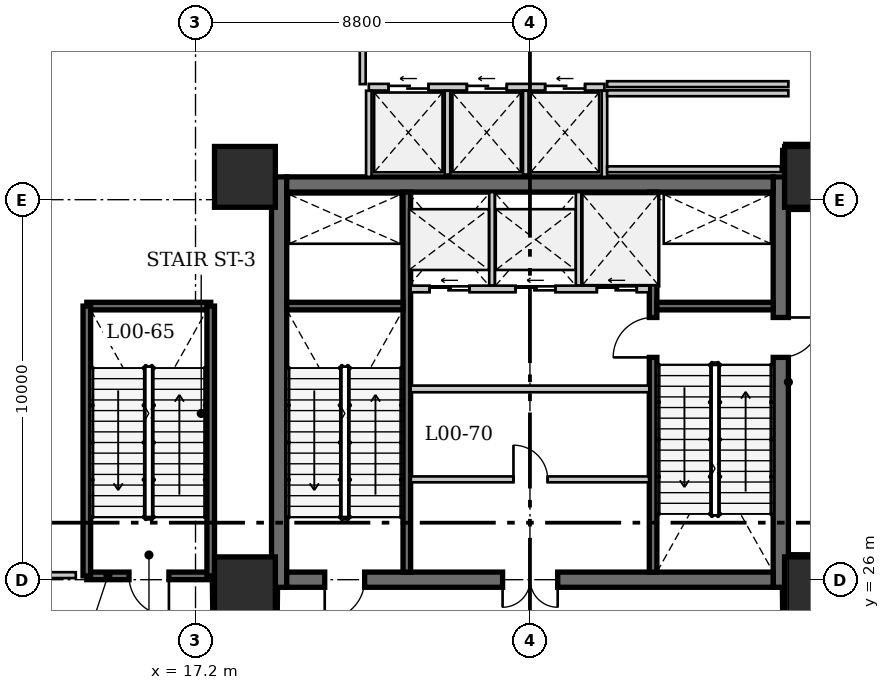
"""IFC4 building model, lengths in metres.
Left out: names, types, materials, properties, quantities, classifications, styles, units other than length and angle.
Written with IfcOpenShell. Run it as: python <this file> out.ifc"""

import sys

from ifc_helpers import new_model, si_unit, direction, frame, frame_2d, origin, origin_2d, place, context, subcontext, project, spatial, rectangle, extrude, source, transform, mapped, element, fill, save


model = new_model("IFC4")
c1 = context("Model", 3, precision=1e-05, world=origin(), true_north=direction((0.0, 1.0)))
c2 = subcontext(c1, "Body", "Model", "MODEL_VIEW")
j1 = project(units=[si_unit("LENGTHUNIT", "METRE"), si_unit("PLANEANGLEUNIT", "RADIAN")], contexts=[c1])
p1 = place(None, origin())
s1 = spatial("IfcSite", under=j1, at=p1, CompositionType="ELEMENT")
p2 = place(p1, origin())
s2 = spatial("IfcBuilding", under=s1, at=p2, CompositionType="ELEMENT")
p3 = place(p2, origin())
s3 = spatial("IfcBuildingStorey", under=s2, at=p3, CompositionType="ELEMENT", Elevation=0.0)
for number, where, z_axis, x_axis in (
    (1, (18.5, 25.8, 0.0), (0.0, 0.0, 1.0), (1.0, 0.0, 0.0)),
    (2, (18.5, 36.6, 0.0), (0.0, 0.0, 1.0), (1.0, 0.0, 0.0)),
    (3, (33.5, 25.8, 0.0), (0.0, 0.0, 1.0), (1.0, 0.0, 0.0)),
    (4, (33.5, 36.6, 0.0), (0.0, 0.0, 1.0), (1.0, 0.0, 0.0)),
):
    element("IfcColumn", number, at=place(p3, frame(where, z_axis=z_axis, x_axis=x_axis)), inside=s3, PredefinedType="COLUMN", context=c2, shape_type="SweptSolid", body=[
        extrude(rectangle(XDim=1.6, YDim=1.6, at=origin_2d()), origin(), (0.0, 0.0, 1.0), 4.9),
    ])
p4 = place(p3, frame((19.4, 25.8, 0.0), z_axis=(0.0, 0.0, 1.0), x_axis=(0.0, 1.0, 0.0)))
e5 = element("IfcWall", 5, at=p4, inside=s3, PredefinedType="SHEAR", context=c2, shape_type="SweptSolid", body=[
    extrude(rectangle(XDim=10.8, YDim=0.4, at=frame_2d((5.4, 0.0))), origin(), (0.0, 0.0, 1.0), 5.2),
])
p5 = place(p3, frame((32.6, 36.6, 0.0), z_axis=(0.0, 0.0, 1.0), x_axis=(0.0, -1.0, 0.0)))
e6 = element("IfcWall", 6, at=p5, inside=s3, PredefinedType="SHEAR", context=c2, shape_type="SweptSolid", body=[
    extrude(rectangle(XDim=10.8, YDim=0.4, at=frame_2d((5.4, 0.0))), origin(), (0.0, 0.0, 1.0), 5.2),
])
p6 = place(p5, frame((3.7, 0.0, 0.0)))
e7 = element("IfcOpeningElement", 7, at=p6, cuts=e6, PredefinedType="OPENING", context=c2, shape_type="SweptSolid", body=[
    extrude(rectangle(XDim=1.05, YDim=2.15, at=frame_2d((0.525, 1.075))), frame((0.0, 0.21, 0.0), z_axis=(0.0, -1.0, 0.0), x_axis=(1.0, 0.0, 0.0)), (0.0, 0.0, 1.0), 0.42),
])
p7 = place(p3, frame((19.6, 36.4, 0.0), z_axis=(0.0, 0.0, 1.0), x_axis=(1.0, 0.0, 0.0)))
e8 = element("IfcWall", 8, at=p7, inside=s3, PredefinedType="SHEAR", context=c2, shape_type="SweptSolid", body=[
    extrude(rectangle(XDim=12.8, YDim=0.4, at=frame_2d((6.4, 0.0))), origin(), (0.0, 0.0, 1.0), 5.2),
])
p8 = place(p3, frame((32.4, 26.0, 0.0), z_axis=(0.0, 0.0, 1.0), x_axis=(-1.0, 0.0, 0.0)))
e9 = element("IfcWall", 9, at=p8, inside=s3, PredefinedType="SHEAR", context=c2, shape_type="SweptSolid", body=[
    extrude(rectangle(XDim=12.8, YDim=0.4, at=frame_2d((6.4, 0.0))), origin(), (0.0, 0.0, 1.0), 5.2),
])
p9 = place(p8, frame((10.75, 0.0, 0.0)))
e10 = element("IfcOpeningElement", 10, at=p9, cuts=e9, PredefinedType="OPENING", context=c2, shape_type="SweptSolid", body=[
    extrude(rectangle(XDim=1.05, YDim=2.15, at=frame_2d((0.525, 1.075))), frame((0.0, 0.21, 0.0), z_axis=(0.0, -1.0, 0.0), x_axis=(1.0, 0.0, 0.0)), (0.0, 0.0, 1.0), 0.42),
])
p10 = place(p8, frame((5.67, 0.0, 0.0)))
e11 = element("IfcOpeningElement", 11, at=p10, cuts=e9, PredefinedType="OPENING", context=c2, shape_type="SweptSolid", body=[
    extrude(rectangle(XDim=1.45, YDim=2.2, at=frame_2d((0.725, 1.1))), frame((0.0, 0.21, 0.0), z_axis=(0.0, -1.0, 0.0), x_axis=(1.0, 0.0, 0.0)), (0.0, 0.0, 1.0), 0.42),
])
p11 = place(p3, frame((22.76, 26.2, 0.0), z_axis=(0.0, 0.0, 1.0), x_axis=(0.0, 1.0, 0.0)))
e12 = element("IfcWall", 12, at=p11, inside=s3, PredefinedType="SHEAR", context=c2, shape_type="SweptSolid", body=[
    extrude(rectangle(XDim=10.0, YDim=0.2, at=frame_2d((5.0, 0.0))), origin(), (0.0, 0.0, 1.0), 5.2),
])
p12 = place(p3, frame((29.24, 26.2, 0.0), z_axis=(0.0, 0.0, 1.0), x_axis=(0.0, 1.0, 0.0)))
e13 = element("IfcWall", 13, at=p12, inside=s3, PredefinedType="SHEAR", context=c2, shape_type="SweptSolid", body=[
    extrude(rectangle(XDim=10.0, YDim=0.2, at=frame_2d((5.0, 0.0))), origin(), (0.0, 0.0, 1.0), 5.2),
])
p13 = place(p12, frame((5.65, 0.0, 0.0)))
e14 = element("IfcOpeningElement", 14, at=p13, cuts=e13, PredefinedType="OPENING", context=c2, shape_type="SweptSolid", body=[
    extrude(rectangle(XDim=1.05, YDim=2.15, at=frame_2d((0.525, 1.075))), frame((0.0, 0.11, 0.0), z_axis=(0.0, -1.0, 0.0), x_axis=(1.0, 0.0, 0.0)), (0.0, 0.0, 1.0), 0.22),
])
for number, where, z_axis, x_axis in (
    (15, (19.6, 33.2, 0.0), (0.0, 0.0, 1.0), (1.0, 0.0, 0.0)),
    (16, (29.34, 33.2, 0.0), (0.0, 0.0, 1.0), (1.0, 0.0, 0.0)),
):
    element("IfcWall", number, at=place(p3, frame(where, z_axis=z_axis, x_axis=x_axis)), inside=s3, PredefinedType="SHEAR", context=c2, shape_type="SweptSolid", body=[
        extrude(rectangle(XDim=3.06, YDim=0.2, at=frame_2d((1.53, 0.0))), origin(), (0.0, 0.0, 1.0), 5.2),
    ])
p14 = place(p3, frame((22.86, 33.65, 0.0), z_axis=(0.0, 0.0, 1.0), x_axis=(1.0, 0.0, 0.0)))
e17 = element("IfcWall", 17, at=p14, inside=s3, PredefinedType="SOLIDWALL", context=c2, shape_type="SweptSolid", body=[
    extrude(rectangle(XDim=6.28, YDim=0.175, at=frame_2d((3.14, 0.0))), origin(), (0.0, 0.0, 1.0), 4.9),
])
p15 = place(p14, frame((0.5, 0.0, 0.0)))
e18 = element("IfcOpeningElement", 18, at=p15, cuts=e17, PredefinedType="OPENING", context=c2, shape_type="SweptSolid", body=[
    extrude(rectangle(XDim=1.05, YDim=2.15, at=frame_2d((0.525, 1.075))), frame((0.0, 0.098, 0.0), z_axis=(0.0, -1.0, 0.0), x_axis=(1.0, 0.0, 0.0)), (0.0, 0.0, 1.0), 0.195),
])
p16 = place(p14, frame((2.76, 0.0, 0.0)))
e19 = element("IfcOpeningElement", 19, at=p16, cuts=e17, PredefinedType="OPENING", context=c2, shape_type="SweptSolid", body=[
    extrude(rectangle(XDim=1.05, YDim=2.15, at=frame_2d((0.525, 1.075))), frame((0.0, 0.098, 0.0), z_axis=(0.0, -1.0, 0.0), x_axis=(1.0, 0.0, 0.0)), (0.0, 0.0, 1.0), 0.195),
])
p17 = place(p14, frame((4.9, 0.0, 0.0)))
e20 = element("IfcOpeningElement", 20, at=p17, cuts=e17, PredefinedType="OPENING", context=c2, shape_type="SweptSolid", body=[
    extrude(rectangle(XDim=1.05, YDim=2.15, at=frame_2d((0.525, 1.075))), frame((0.0, 0.098, 0.0), z_axis=(0.0, -1.0, 0.0), x_axis=(1.0, 0.0, 0.0)), (0.0, 0.0, 1.0), 0.195),
])
for number, where, z_axis, x_axis in (
    (21, (25.0, 33.743, 0.0), (0.0, 0.0, 1.0), (0.0, 1.0, 0.0)),
    (22, (27.28, 33.743, 0.0), (0.0, 0.0, 1.0), (0.0, 1.0, 0.0)),
):
    element("IfcWall", number, at=place(p3, frame(where, z_axis=z_axis, x_axis=x_axis)), inside=s3, PredefinedType="SOLIDWALL", context=c2, shape_type="SweptSolid", body=[
        extrude(rectangle(XDim=2.457, YDim=0.145, at=frame_2d((1.228, 0.0))), origin(), (0.0, 0.0, 1.0), 4.9),
    ])
p18 = place(p3, frame((22.86, 31.02, 0.0), z_axis=(0.0, 0.0, 1.0), x_axis=(1.0, 0.0, 0.0)))
e23 = element("IfcWall", 23, at=p18, inside=s3, PredefinedType="SOLIDWALL", context=c2, shape_type="SweptSolid", body=[
    extrude(rectangle(XDim=6.28, YDim=0.175, at=frame_2d((3.14, 0.0))), origin(), (0.0, 0.0, 1.0), 4.9),
])
p19 = place(p3, frame((22.866, 28.64, 0.0), z_axis=(0.0, 0.0, 1.0), x_axis=(1.0, 0.0, 0.0)))
e24 = element("IfcWall", 24, at=p19, inside=s3, PredefinedType="PARTITIONING", context=c2, shape_type="SweptSolid", body=[
    extrude(rectangle(XDim=6.268, YDim=0.155, at=frame_2d((3.134, 0.0))), origin(), (0.0, 0.0, 1.0), 4.9),
])
p20 = place(p19, frame((2.7, 0.0, 0.0)))
e25 = element("IfcOpeningElement", 25, at=p20, cuts=e24, PredefinedType="OPENING", context=c2, shape_type="SweptSolid", body=[
    extrude(rectangle(XDim=0.9, YDim=2.1, at=frame_2d((0.45, 1.05))), frame((0.0, 0.087, 0.0), z_axis=(0.0, -1.0, 0.0), x_axis=(1.0, 0.0, 0.0)), (0.0, 0.0, 1.0), 0.175),
])
p21 = place(p3, frame((21.76, 38.96, 0.0), z_axis=(0.0, 0.0, 1.0), x_axis=(1.0, 0.0, 0.0)))
e26 = element("IfcWall", 26, at=p21, inside=s3, PredefinedType="SOLIDWALL", context=c2, shape_type="SweptSolid", body=[
    extrude(rectangle(XDim=6.2, YDim=0.175, at=frame_2d((3.1, 0.0))), origin(), (0.0, 0.0, 1.0), 4.9),
])
p22 = place(p21, frame((0.52, 0.0, 0.0)))
e27 = element("IfcOpeningElement", 27, at=p22, cuts=e26, PredefinedType="OPENING", context=c2, shape_type="SweptSolid", body=[
    extrude(rectangle(XDim=1.05, YDim=2.15, at=frame_2d((0.525, 1.075))), frame((0.0, 0.098, 0.0), z_axis=(0.0, -1.0, 0.0), x_axis=(1.0, 0.0, 0.0)), (0.0, 0.0, 1.0), 0.195),
])
p23 = place(p21, frame((2.58, 0.0, 0.0)))
e28 = element("IfcOpeningElement", 28, at=p23, cuts=e26, PredefinedType="OPENING", context=c2, shape_type="SweptSolid", body=[
    extrude(rectangle(XDim=1.05, YDim=2.15, at=frame_2d((0.525, 1.075))), frame((0.0, 0.098, 0.0), z_axis=(0.0, -1.0, 0.0), x_axis=(1.0, 0.0, 0.0)), (0.0, 0.0, 1.0), 0.195),
])
p24 = place(p21, frame((4.64, 0.0, 0.0)))
e29 = element("IfcOpeningElement", 29, at=p24, cuts=e26, PredefinedType="OPENING", context=c2, shape_type="SweptSolid", body=[
    extrude(rectangle(XDim=1.05, YDim=2.15, at=frame_2d((0.525, 1.075))), frame((0.0, 0.098, 0.0), z_axis=(0.0, -1.0, 0.0), x_axis=(1.0, 0.0, 0.0)), (0.0, 0.0, 1.0), 0.195),
])
for number, where, z_axis, x_axis in (
    (30, (21.76, 36.6, 0.0), (0.0, 0.0, 1.0), (0.0, 1.0, 0.0)),
    (31, (27.96, 36.6, 0.0), (0.0, 0.0, 1.0), (0.0, 1.0, 0.0)),
):
    element("IfcWall", number, at=place(p3, frame(where, z_axis=z_axis, x_axis=x_axis)), inside=s3, PredefinedType="SOLIDWALL", context=c2, shape_type="SweptSolid", body=[
        extrude(rectangle(XDim=2.266, YDim=0.145, at=frame_2d((1.133, 0.0))), origin(), (0.0, 0.0, 1.0), 4.9),
    ])
for number, where, z_axis, x_axis in (
    (32, (23.83, 36.66, 0.0), (0.0, 0.0, 1.0), (0.0, 1.0, 0.0)),
    (33, (25.89, 36.66, 0.0), (0.0, 0.0, 1.0), (0.0, 1.0, 0.0)),
):
    element("IfcWall", number, at=place(p3, frame(where, z_axis=z_axis, x_axis=x_axis)), inside=s3, PredefinedType="SOLIDWALL", context=c2, shape_type="SweptSolid", body=[
        extrude(rectangle(XDim=2.207, YDim=0.145, at=frame_2d((1.103, 0.0))), origin(), (0.0, 0.0, 1.0), 4.9),
    ])
p25 = place(p3, frame((17.6, 26.1, 0.0), z_axis=(0.0, 0.0, 1.0), x_axis=(-1.0, 0.0, 0.0)))
e34 = element("IfcWall", 34, at=p25, inside=s3, PredefinedType="SHEAR", context=c2, shape_type="SweptSolid", body=[
    extrude(rectangle(XDim=3.26, YDim=0.2, at=frame_2d((1.63, 0.0))), origin(), (0.0, 0.0, 1.0), 5.2),
])
p26 = place(p25, frame((1.1, 0.0, 0.0)))
e35 = element("IfcOpeningElement", 35, at=p26, cuts=e34, PredefinedType="OPENING", context=c2, shape_type="SweptSolid", body=[
    extrude(rectangle(XDim=1.05, YDim=2.15, at=frame_2d((0.525, 1.075))), frame((0.0, 0.11, 0.0), z_axis=(0.0, -1.0, 0.0), x_axis=(1.0, 0.0, 0.0)), (0.0, 0.0, 1.0), 0.22),
])
p27 = place(p3, frame((14.34, 33.2, 0.0), z_axis=(0.0, 0.0, 1.0), x_axis=(1.0, 0.0, 0.0)))
e36 = element("IfcWall", 36, at=p27, inside=s3, PredefinedType="SHEAR", context=c2, shape_type="SweptSolid", body=[
    extrude(rectangle(XDim=3.26, YDim=0.2, at=frame_2d((1.63, 0.0))), origin(), (0.0, 0.0, 1.0), 5.2),
])
for number, where, z_axis, x_axis in (
    (37, (14.34, 26.1, 0.0), (0.0, 0.0, 1.0), (0.0, 1.0, 0.0)),
    (38, (17.6, 26.1, 0.0), (0.0, 0.0, 1.0), (0.0, 1.0, 0.0)),
):
    element("IfcWall", number, at=place(p3, frame(where, z_axis=z_axis, x_axis=x_axis)), inside=s3, PredefinedType="SHEAR", context=c2, shape_type="SweptSolid", body=[
        extrude(rectangle(XDim=7.1, YDim=0.2, at=frame_2d((3.55, 0.0))), origin(), (0.0, 0.0, 1.0), 5.2),
    ])
p28 = place(p3, frame((11.698, 26.12, 0.0), z_axis=(0.0, 0.0, 1.0), x_axis=(1.0, 0.0, 0.0)))
e39 = element("IfcWall", 39, at=p28, inside=s3, PredefinedType="PARTITIONING", context=c2, shape_type="SweptSolid", body=[
    extrude(rectangle(XDim=2.352, YDim=0.155, at=frame_2d((1.176, 0.0))), origin(), (0.0, 0.0, 1.0), 4.9),
])
p29 = place(p3, frame((17.685, 25.95, 0.0), z_axis=(0.0, 0.0, 1.0), x_axis=(0.013915656501, -0.999903172564, 0.0)))
e40 = element("IfcWall", 40, at=p29, inside=s3, PredefinedType="PARTITIONING", context=c2, shape_type="SweptSolid", body=[
    extrude(rectangle(XDim=0.965, YDim=0.155, at=frame_2d((0.482, 0.0))), origin(), (0.0, 0.0, 1.0), 4.9),
])
p30 = place(p3, frame((19.308, 25.07, 0.0), z_axis=(0.0, 0.0, 1.0), x_axis=(0.010362137944, 0.999946311607, 0.0)))
e41 = element("IfcWall", 41, at=p30, inside=s3, PredefinedType="PARTITIONING", context=c2, shape_type="SweptSolid", body=[
    extrude(rectangle(XDim=0.66, YDim=0.155, at=frame_2d((0.33, 0.0))), origin(), (0.0, 0.0, 1.0), 4.9),
])
p31 = place(p3, frame((32.685, 25.73, 0.0), z_axis=(0.0, 0.0, 1.0), x_axis=(0.010511902743, -0.999944748424, 0.0)))
e42 = element("IfcWall", 42, at=p31, inside=s3, PredefinedType="PARTITIONING", context=c2, shape_type="SweptSolid", body=[
    extrude(rectangle(XDim=0.743, YDim=0.155, at=frame_2d((0.372, 0.0))), origin(), (0.0, 0.0, 1.0), 4.9),
])
p32 = place(p3, frame((34.227, 26.611, 0.0), z_axis=(0.0, 0.0, 1.0), x_axis=(-0.999995856473, 0.002878721429, 0.0)))
e43 = element("IfcWall", 43, at=p32, inside=s3, PredefinedType="PARTITIONING", context=c2, shape_type="SweptSolid", body=[
    extrude(rectangle(XDim=1.357, YDim=0.155, at=frame_2d((0.678, 0.0))), origin(), (0.0, 0.0, 1.0), 4.9),
])
p33 = place(p3, frame((32.87, 35.785, 0.0), z_axis=(0.0, 0.0, 1.0), x_axis=(0.99999584892, 0.002881343971, 0.0)))
e44 = element("IfcWall", 44, at=p33, inside=s3, PredefinedType="PARTITIONING", context=c2, shape_type="SweptSolid", body=[
    extrude(rectangle(XDim=1.44, YDim=0.155, at=frame_2d((0.72, 0.0))), origin(), (0.0, 0.0, 1.0), 4.9),
])
p34 = place(p3, frame((34.228, 37.41, 0.0), z_axis=(0.0, 0.0, 1.0), x_axis=(-0.999996338411, 0.002706134631, 0.0)))
e45 = element("IfcWall", 45, at=p34, inside=s3, PredefinedType="PARTITIONING", context=c2, shape_type="SweptSolid", body=[
    extrude(rectangle(XDim=1.534, YDim=0.155, at=frame_2d((0.767, 0.0))), origin(), (0.0, 0.0, 1.0), 4.9),
])
p35 = place(p3, frame((32.693, 37.33, 0.0), z_axis=(0.0, 0.0, 1.0), x_axis=(-0.015191616862, -0.99988460073, 0.0)))
e46 = element("IfcWall", 46, at=p35, inside=s3, PredefinedType="PARTITIONING", context=c2, shape_type="SweptSolid", body=[
    extrude(rectangle(XDim=0.53, YDim=0.155, at=frame_2d((0.265, 0.0))), origin(), (0.0, 0.0, 1.0), 4.9),
])
p36 = place(p3, frame((32.602, 36.8, 0.0), z_axis=(0.0, 0.0, 1.0), x_axis=(-1.0, 0.0, 0.0)))
e47 = element("IfcWall", 47, at=p36, inside=s3, PredefinedType="PARTITIONING", context=c2, shape_type="SweptSolid", body=[
    extrude(rectangle(XDim=4.572, YDim=0.155, at=frame_2d((2.286, 0.0))), origin(), (0.0, 0.0, 1.0), 4.9),
])
for number, where, z_axis, x_axis in (
    (48, (28.03, 38.8, 0.0), (0.0, 0.0, 1.0), (1.0, 0.0, 0.0)),
    (49, (32.8, 39.04, 0.0), (0.0, 0.0, 1.0), (-1.0, 0.0, 0.0)),
):
    element("IfcWall", number, at=place(p3, frame(where, z_axis=z_axis, x_axis=x_axis)), inside=s3, PredefinedType="PARTITIONING", context=c2, shape_type="SweptSolid", body=[
        extrude(rectangle(XDim=4.77, YDim=0.155, at=frame_2d((2.385, 0.0))), origin(), (0.0, 0.0, 1.0), 4.9),
    ])
p37 = place(p3, frame((21.6, 39.04, 0.0), z_axis=(0.0, 0.0, 1.0), x_axis=(0.0, 1.0, 0.0)))
e50 = element("IfcWall", 50, at=p37, inside=s3, PredefinedType="PARTITIONING", context=c2, shape_type="SweptSolid", body=[
    extrude(rectangle(XDim=1.876, YDim=0.155, at=frame_2d((0.938, 0.0))), origin(), (0.0, 0.0, 1.0), 4.9),
])
m1 = source(origin(), c2, "Body", "SweptSolid", [
    extrude(rectangle(XDim=1.05, YDim=2.15, at=frame_2d((0.525, 1.075))), frame((0.0, 0.025, 0.0), z_axis=(0.0, -1.0, 0.0), x_axis=(1.0, 0.0, 0.0)), (0.0, 0.0, 1.0), 0.05),
])
p38 = place(p9, origin())
e51 = element("IfcDoor", 51, at=p38, inside=s3, OperationType="SINGLE_SWING_RIGHT", PredefinedType="DOOR", context=c2, shape_type="MappedRepresentation", body=[
    mapped(m1, transform((0.0, 0.0, 0.0), x_axis=(1.0, 0.0, 0.0), y_axis=(0.0, 1.0, 0.0), z_axis=(0.0, 0.0, 1.0), scale=1.0)),
])
fill(e10, e51)
m2 = source(origin(), c2, "Body", "SweptSolid", [
    extrude(rectangle(XDim=1.45, YDim=2.2, at=frame_2d((0.725, 1.1))), frame((0.0, 0.025, 0.0), z_axis=(0.0, -1.0, 0.0), x_axis=(1.0, 0.0, 0.0)), (0.0, 0.0, 1.0), 0.05),
])
p39 = place(p10, origin())
e52 = element("IfcDoor", 52, at=p39, inside=s3, OperationType="DOUBLE_DOOR_SINGLE_SWING", PredefinedType="DOOR", context=c2, shape_type="MappedRepresentation", body=[
    mapped(m2, transform((0.0, 0.0, 0.0), x_axis=(1.0, 0.0, 0.0), y_axis=(0.0, 1.0, 0.0), z_axis=(0.0, 0.0, 1.0), scale=1.0)),
])
fill(e11, e52)
p40 = place(p6, origin())
e53 = element("IfcDoor", 53, at=p40, inside=s3, OperationType="SINGLE_SWING_LEFT", PredefinedType="DOOR", context=c2, shape_type="MappedRepresentation", body=[
    mapped(m1, transform((0.0, 0.0, 0.0), x_axis=(1.0, 0.0, 0.0), y_axis=(0.0, 1.0, 0.0), z_axis=(0.0, 0.0, 1.0), scale=1.0)),
])
fill(e7, e53)
p41 = place(p13, origin())
e54 = element("IfcDoor", 54, at=p41, inside=s3, OperationType="SINGLE_SWING_LEFT", PredefinedType="DOOR", context=c2, shape_type="MappedRepresentation", body=[
    mapped(m1, transform((0.0, 0.0, 0.0), x_axis=(1.0, 0.0, 0.0), y_axis=(0.0, 1.0, 0.0), z_axis=(0.0, 0.0, 1.0), scale=1.0)),
])
fill(e14, e54)
m3 = source(origin(), c2, "Body", "SweptSolid", [
    extrude(rectangle(XDim=1.05, YDim=2.15, at=frame_2d((0.525, 1.075))), frame((0.0, 0.025, 0.0), z_axis=(0.0, -1.0, 0.0), x_axis=(1.0, 0.0, 0.0)), (0.0, 0.0, 1.0), 0.05),
])
p42 = place(p15, origin())
e55 = element("IfcDoor", 55, at=p42, inside=s3, OperationType="SLIDING_TO_LEFT", PredefinedType="DOOR", context=c2, shape_type="MappedRepresentation", body=[
    mapped(m3, transform((0.0, 0.0, 0.0), x_axis=(1.0, 0.0, 0.0), y_axis=(0.0, 1.0, 0.0), z_axis=(0.0, 0.0, 1.0), scale=1.0)),
])
fill(e18, e55)
p43 = place(p16, origin())
e56 = element("IfcDoor", 56, at=p43, inside=s3, OperationType="SLIDING_TO_LEFT", PredefinedType="DOOR", context=c2, shape_type="MappedRepresentation", body=[
    mapped(m3, transform((0.0, 0.0, 0.0), x_axis=(1.0, 0.0, 0.0), y_axis=(0.0, 1.0, 0.0), z_axis=(0.0, 0.0, 1.0), scale=1.0)),
])
fill(e19, e56)
p44 = place(p17, origin())
e57 = element("IfcDoor", 57, at=p44, inside=s3, OperationType="SLIDING_TO_LEFT", PredefinedType="DOOR", context=c2, shape_type="MappedRepresentation", body=[
    mapped(m3, transform((0.0, 0.0, 0.0), x_axis=(1.0, 0.0, 0.0), y_axis=(0.0, 1.0, 0.0), z_axis=(0.0, 0.0, 1.0), scale=1.0)),
])
fill(e20, e57)
m4 = source(origin(), c2, "Body", "SweptSolid", [
    extrude(rectangle(XDim=0.9, YDim=2.1, at=frame_2d((0.45, 1.05))), frame((0.0, 0.025, 0.0), z_axis=(0.0, -1.0, 0.0), x_axis=(1.0, 0.0, 0.0)), (0.0, 0.0, 1.0), 0.05),
])
p45 = place(p20, origin())
e58 = element("IfcDoor", 58, at=p45, inside=s3, OperationType="SINGLE_SWING_LEFT", PredefinedType="DOOR", context=c2, shape_type="MappedRepresentation", body=[
    mapped(m4, transform((0.0, 0.0, 0.0), x_axis=(1.0, 0.0, 0.0), y_axis=(0.0, 1.0, 0.0), z_axis=(0.0, 0.0, 1.0), scale=1.0)),
])
fill(e25, e58)
p46 = place(p22, origin())
e59 = element("IfcDoor", 59, at=p46, inside=s3, OperationType="SLIDING_TO_LEFT", PredefinedType="DOOR", context=c2, shape_type="MappedRepresentation", body=[
    mapped(m3, transform((0.0, 0.0, 0.0), x_axis=(1.0, 0.0, 0.0), y_axis=(0.0, 1.0, 0.0), z_axis=(0.0, 0.0, 1.0), scale=1.0)),
])
fill(e27, e59)
p47 = place(p23, origin())
e60 = element("IfcDoor", 60, at=p47, inside=s3, OperationType="SLIDING_TO_LEFT", PredefinedType="DOOR", context=c2, shape_type="MappedRepresentation", body=[
    mapped(m3, transform((0.0, 0.0, 0.0), x_axis=(1.0, 0.0, 0.0), y_axis=(0.0, 1.0, 0.0), z_axis=(0.0, 0.0, 1.0), scale=1.0)),
])
fill(e28, e60)
p48 = place(p24, origin())
e61 = element("IfcDoor", 61, at=p48, inside=s3, OperationType="SLIDING_TO_LEFT", PredefinedType="DOOR", context=c2, shape_type="MappedRepresentation", body=[
    mapped(m3, transform((0.0, 0.0, 0.0), x_axis=(1.0, 0.0, 0.0), y_axis=(0.0, 1.0, 0.0), z_axis=(0.0, 0.0, 1.0), scale=1.0)),
])
fill(e29, e61)
p49 = place(p26, origin())
e62 = element("IfcDoor", 62, at=p49, inside=s3, OperationType="SINGLE_SWING_LEFT", PredefinedType="DOOR", context=c2, shape_type="MappedRepresentation", body=[
    mapped(m1, transform((0.0, 0.0, 0.0), x_axis=(1.0, 0.0, 0.0), y_axis=(0.0, 1.0, 0.0), z_axis=(0.0, 0.0, 1.0), scale=1.0)),
])
fill(e35, e62)
save(model, sys.argv[1])
